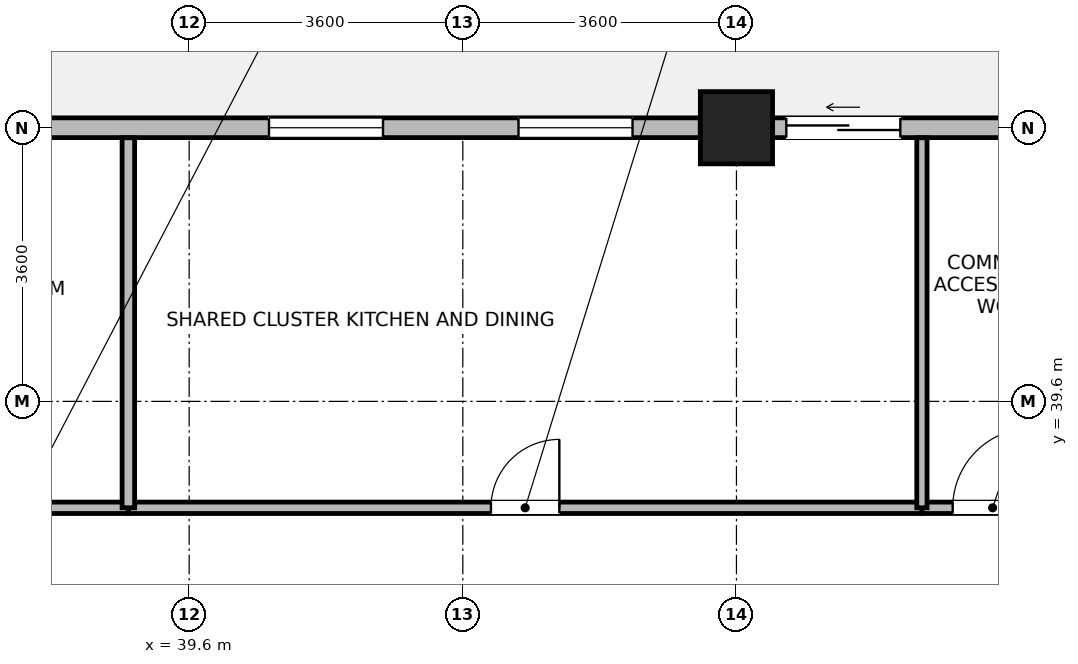
"""IFC4 building model, lengths in metres.
Left out: names, types, materials, properties, quantities, classifications, styles, units other than length and angle.
Written with IfcOpenShell. Run it as: python <this file> out.ifc"""

import sys

from ifc_helpers import new_model, si_unit, direction, frame, frame_2d, origin, origin_2d, place, context, subcontext, project, spatial, rectangle, extrude, source, transform, mapped, element, fill, save


model = new_model("IFC4")
c1 = context("Model", 3, precision=1e-05, world=origin(), true_north=direction((0.0, 1.0)))
c2 = subcontext(c1, "Body", "Model", "MODEL_VIEW")
j1 = project(units=[si_unit("LENGTHUNIT", "METRE"), si_unit("PLANEANGLEUNIT", "RADIAN")], contexts=[c1])
p1 = place(None, origin())
s1 = spatial("IfcSite", under=j1, at=p1, CompositionType="ELEMENT")
p2 = place(p1, origin())
s2 = spatial("IfcBuilding", under=s1, at=p2, CompositionType="ELEMENT")
p3 = place(p2, frame((0.0, 0.0, 224.0)))
s3 = spatial("IfcBuildingStorey", under=s2, at=p3, CompositionType="ELEMENT", Elevation=224.0)
m1 = source(origin(), c2, "Body", "SweptSolid", [
    extrude(rectangle(XDim=0.95, YDim=0.95, at=origin_2d()), origin(), (0.0, 0.0, 1.0), 3.7),
])
p4 = place(p3, frame((46.8, 43.2, 0.0), z_axis=(0.0, 0.0, 1.0), x_axis=(1.0, 0.0, 0.0)))
e1 = element("IfcColumn", 1, at=p4, inside=s3, PredefinedType="COLUMN", context=c2, shape_type="MappedRepresentation", body=[
    mapped(m1, transform((0.0, 0.0, 0.0), x_axis=(1.0, 0.0, 0.0), y_axis=(0.0, 1.0, 0.0), z_axis=(0.0, 0.0, 1.0), scale=1.0)),
])
p5 = place(p3, frame((47.276, 43.2, 0.0), z_axis=(0.0, 0.0, 1.0), x_axis=(1.0, 0.0, 0.0)))
e2 = element("IfcWall", 2, at=p5, inside=s3, PredefinedType="STANDARD", context=c2, shape_type="SweptSolid", body=[
    extrude(rectangle(XDim=3.689, YDim=0.26, at=frame_2d((1.845, 0.0))), origin(), (0.0, 0.0, 1.0), 3.45),
])
p6 = place(p5, frame((0.18, 0.0, 0.0)))
e3 = element("IfcOpeningElement", 3, at=p6, cuts=e2, PredefinedType="OPENING", context=c2, shape_type="SweptSolid", body=[
    extrude(rectangle(XDim=1.5, YDim=2.15, at=frame_2d((0.75, 1.075))), frame((0.0, 0.14, 0.0), z_axis=(0.0, -1.0, 0.0), x_axis=(1.0, 0.0, 0.0)), (0.0, 0.0, 1.0), 0.28),
])
p7 = place(p3, frame((36.476, 43.2, 0.0), z_axis=(0.0, 0.0, 1.0), x_axis=(1.0, 0.0, 0.0)))
e4 = element("IfcWall", 4, at=p7, inside=s3, PredefinedType="STANDARD", context=c2, shape_type="SweptSolid", body=[
    extrude(rectangle(XDim=9.848, YDim=0.26, at=frame_2d((4.924, 0.0))), origin(), (0.0, 0.0, 1.0), 3.05),
])
p8 = place(p7, frame((4.174, 0.0, 0.85)))
e5 = element("IfcOpeningElement", 5, at=p8, cuts=e4, PredefinedType="OPENING", context=c2, shape_type="SweptSolid", body=[
    extrude(rectangle(XDim=1.5, YDim=1.85, at=frame_2d((0.75, 0.925))), frame((0.0, 0.14, 0.0), z_axis=(0.0, -1.0, 0.0), x_axis=(1.0, 0.0, 0.0)), (0.0, 0.0, 1.0), 0.28),
])
p9 = place(p7, frame((7.457, 0.0, 0.85)))
e6 = element("IfcOpeningElement", 6, at=p9, cuts=e4, PredefinedType="OPENING", context=c2, shape_type="SweptSolid", body=[
    extrude(rectangle(XDim=1.5, YDim=1.85, at=frame_2d((0.75, 0.925))), frame((0.0, 0.14, 0.0), z_axis=(0.0, -1.0, 0.0), x_axis=(1.0, 0.0, 0.0)), (0.0, 0.0, 1.0), 0.28),
])
p10 = place(p3, frame((38.8, 38.2, 0.0), z_axis=(0.0, 0.0, 1.0), x_axis=(1.0, 0.0, 0.0)))
e7 = element("IfcWall", 7, at=p10, inside=s3, PredefinedType="PARTITIONING", context=c2, shape_type="SweptSolid", body=[
    extrude(rectangle(XDim=10.44, YDim=0.15, at=frame_2d((5.22, 0.0))), origin(), (0.0, 0.0, 1.0), 3.45),
])
p11 = place(p10, frame((4.77, 0.0, 0.0)))
e8 = element("IfcOpeningElement", 8, at=p11, cuts=e7, PredefinedType="OPENING", context=c2, shape_type="SweptSolid", body=[
    extrude(rectangle(XDim=0.9, YDim=2.08, at=frame_2d((0.45, 1.04))), frame((0.0, 0.085, 0.0), z_axis=(0.0, -1.0, 0.0), x_axis=(1.0, 0.0, 0.0)), (0.0, 0.0, 1.0), 0.17),
])
p12 = place(p3, frame((33.3, 38.2, 0.0), z_axis=(0.0, 0.0, 1.0), x_axis=(1.0, 0.0, 0.0)))
e9 = element("IfcWall", 9, at=p12, inside=s3, PredefinedType="PARTITIONING", context=c2, shape_type="SweptSolid", body=[
    extrude(rectangle(XDim=5.5, YDim=0.15, at=frame_2d((2.75, 0.0))), origin(), (0.0, 0.0, 1.0), 3.45),
])
p13 = place(p12, frame((2.275, 0.0, 0.0)))
e10 = element("IfcOpeningElement", 10, at=p13, cuts=e9, PredefinedType="OPENING", context=c2, shape_type="SweptSolid", body=[
    extrude(rectangle(XDim=0.95, YDim=2.1, at=frame_2d((0.475, 1.05))), frame((0.0, 0.085, 0.0), z_axis=(0.0, -1.0, 0.0), x_axis=(1.0, 0.0, 0.0)), (0.0, 0.0, 1.0), 0.17),
])
p14 = place(p3, frame((49.24, 38.2, 0.0), z_axis=(0.0, 0.0, 1.0), x_axis=(1.0, 0.0, 0.0)))
e11 = element("IfcWall", 11, at=p14, inside=s3, PredefinedType="PARTITIONING", context=c2, shape_type="SweptSolid", body=[
    extrude(rectangle(XDim=1.86, YDim=0.15, at=frame_2d((0.93, 0.0))), origin(), (0.0, 0.0, 1.0), 3.45),
])
p15 = place(p14, frame((0.405, 0.0, 0.0)))
e12 = element("IfcOpeningElement", 12, at=p15, cuts=e11, PredefinedType="OPENING", context=c2, shape_type="SweptSolid", body=[
    extrude(rectangle(XDim=1.05, YDim=2.12, at=frame_2d((0.525, 1.06))), frame((0.0, 0.085, 0.0), z_axis=(0.0, -1.0, 0.0), x_axis=(1.0, 0.0, 0.0)), (0.0, 0.0, 1.0), 0.17),
])
p16 = place(p3, frame((38.8, 38.2, 0.0), z_axis=(0.0, 0.0, 1.0), x_axis=(0.0, 1.0, 0.0)))
e13 = element("IfcWall", 13, at=p16, inside=s3, PredefinedType="PARTITIONING", context=c2, shape_type="SweptSolid", body=[
    extrude(rectangle(XDim=4.868, YDim=0.165, at=frame_2d((2.434, 0.0))), origin(), (0.0, 0.0, 1.0), 3.45),
])
p17 = place(p3, frame((49.24, 38.2, 0.0), z_axis=(0.0, 0.0, 1.0), x_axis=(0.0, 1.0, 0.0)))
e14 = element("IfcWall", 14, at=p17, inside=s3, PredefinedType="PARTITIONING", context=c2, shape_type="SweptSolid", body=[
    extrude(rectangle(XDim=4.868, YDim=0.135, at=frame_2d((2.434, 0.0))), origin(), (0.0, 0.0, 1.0), 3.45),
])
p18 = place(p6, origin())
e15 = element("IfcDoor", 15, at=p18, inside=s3, OperationType="SLIDING_TO_LEFT", PredefinedType="DOOR", context=c2, shape_type="SweptSolid", body=[
    extrude(rectangle(XDim=1.5, YDim=2.15, at=frame_2d((0.75, 1.075))), frame((0.0, 0.025, 0.0), z_axis=(0.0, -1.0, 0.0), x_axis=(1.0, 0.0, 0.0)), (0.0, 0.0, 1.0), 0.05),
])
fill(e3, e15)
p19 = place(p8, origin())
e16 = element("IfcWindow", 16, at=p19, inside=s3, PartitioningType="SINGLE_PANEL", PredefinedType="WINDOW", context=c2, shape_type="SweptSolid", body=[
    extrude(rectangle(XDim=1.5, YDim=1.85, at=frame_2d((0.75, 0.925))), frame((0.0, 0.03, 0.0), z_axis=(0.0, -1.0, 0.0), x_axis=(1.0, 0.0, 0.0)), (0.0, 0.0, 1.0), 0.06),
])
fill(e5, e16)
p20 = place(p9, origin())
e17 = element("IfcWindow", 17, at=p20, inside=s3, PartitioningType="SINGLE_PANEL", PredefinedType="WINDOW", context=c2, shape_type="SweptSolid", body=[
    extrude(rectangle(XDim=1.5, YDim=1.85, at=frame_2d((0.75, 0.925))), frame((0.0, 0.03, 0.0), z_axis=(0.0, -1.0, 0.0), x_axis=(1.0, 0.0, 0.0)), (0.0, 0.0, 1.0), 0.06),
])
fill(e6, e17)
p21 = place(p11, origin())
e18 = element("IfcDoor", 18, at=p21, inside=s3, OperationType="SINGLE_SWING_RIGHT", PredefinedType="DOOR", context=c2, shape_type="SweptSolid", body=[
    extrude(rectangle(XDim=0.9, YDim=2.08, at=frame_2d((0.45, 1.04))), frame((0.0, 0.025, 0.0), z_axis=(0.0, -1.0, 0.0), x_axis=(1.0, 0.0, 0.0)), (0.0, 0.0, 1.0), 0.05),
])
fill(e8, e18)
p22 = place(p15, origin())
e19 = element("IfcDoor", 19, at=p22, inside=s3, OperationType="SINGLE_SWING_RIGHT", PredefinedType="DOOR", context=c2, shape_type="SweptSolid", body=[
    extrude(rectangle(XDim=1.05, YDim=2.12, at=frame_2d((0.525, 1.06))), frame((0.0, 0.025, 0.0), z_axis=(0.0, -1.0, 0.0), x_axis=(1.0, 0.0, 0.0)), (0.0, 0.0, 1.0), 0.05),
])
fill(e12, e19)
save(model, sys.argv[1])
